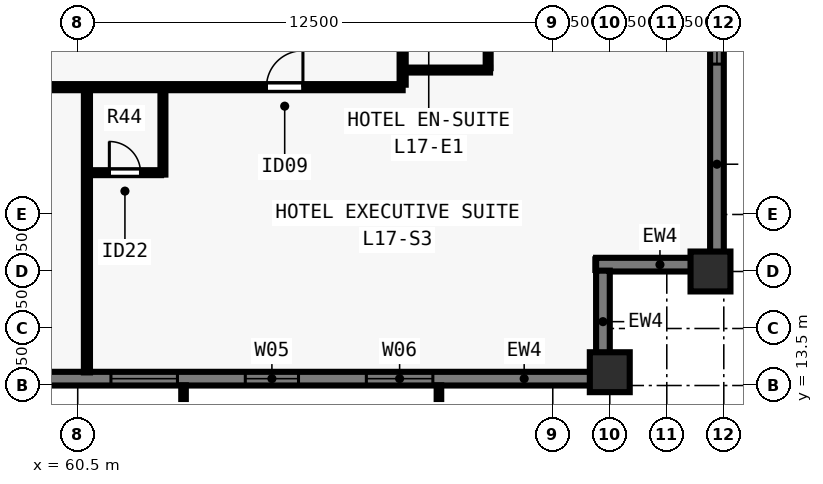
"""IFC4 building model, lengths in metres.
Left out: names, types, materials, properties, quantities, classifications, styles, units other than length and angle.
Written with IfcOpenShell. Run it as: python <this file> out.ifc"""

import sys

from ifc_helpers import new_model, si_unit, direction, frame, frame_2d, origin, origin_2d, place, context, subcontext, project, spatial, rectangle, extrude, element, fill, save


model = new_model("IFC4")
c1 = context("Model", 3, precision=1e-05, world=origin(), true_north=direction((0.0, 1.0)))
c2 = subcontext(c1, "Body", "Model", "MODEL_VIEW")
j1 = project(units=[si_unit("LENGTHUNIT", "METRE"), si_unit("PLANEANGLEUNIT", "RADIAN")], contexts=[c1])
p1 = place(None, origin())
s1 = spatial("IfcSite", under=j1, at=p1, CompositionType="ELEMENT")
p2 = place(p1, origin())
s2 = spatial("IfcBuilding", under=s1, at=p2, CompositionType="ELEMENT")
p3 = place(p2, frame((0.0, 0.0, 65.5)))
s3 = spatial("IfcBuildingStorey", under=s2, at=p3, CompositionType="ELEMENT", Elevation=65.5)
for number, where, z_axis, x_axis in (
    (1, (74.5, 13.85, 0.0), (0.0, 0.0, 1.0), (1.0, 0.0, 0.0)),
    (2, (77.15, 16.5, 0.0), (0.0, 0.0, 1.0), (0.0, 1.0, 0.0)),
):
    element("IfcColumn", number, at=place(p3, frame(where, z_axis=z_axis, x_axis=x_axis)), inside=s3, PredefinedType="COLUMN", context=c2, shape_type="SweptSolid", body=[
        extrude(rectangle(XDim=1.05, YDim=1.05, at=origin_2d()), origin(), (0.0, 0.0, 1.0), 3.5),
    ])
p4 = place(p3, frame((77.32, 34.8, 0.0), z_axis=(0.0, 0.0, 1.0), x_axis=(0.0, -1.0, 0.0)))
e3 = element("IfcWall", 3, at=p4, inside=s3, PredefinedType="SOLIDWALL", context=c2, shape_type="SweptSolid", body=[
    extrude(rectangle(XDim=17.962, YDim=0.36, at=frame_2d((8.981, 0.0))), origin(), (0.0, 0.0, 1.0), 3.28),
])
p5 = place(p4, frame((2.519, 0.0, 0.8)))
e4 = element("IfcOpeningElement", 4, at=p5, cuts=e3, PredefinedType="OPENING", context=c2, shape_type="SweptSolid", body=[
    extrude(rectangle(XDim=1.75, YDim=1.544, at=frame_2d((0.875, 0.772))), frame((0.0, 0.19, 0.0), z_axis=(0.0, -1.0, 0.0), x_axis=(1.0, 0.0, 0.0)), (0.0, 0.0, 1.0), 0.38),
])
p6 = place(p4, frame((6.981, 0.0, 0.8)))
e5 = element("IfcOpeningElement", 5, at=p6, cuts=e3, PredefinedType="OPENING", context=c2, shape_type="SweptSolid", body=[
    extrude(rectangle(XDim=1.4, YDim=1.544, at=frame_2d((0.7, 0.772))), frame((0.0, 0.19, 0.0), z_axis=(0.0, -1.0, 0.0), x_axis=(1.0, 0.0, 0.0)), (0.0, 0.0, 1.0), 0.38),
])
p7 = place(p4, frame((11.093, 0.0, 0.8)))
e6 = element("IfcOpeningElement", 6, at=p7, cuts=e3, PredefinedType="OPENING", context=c2, shape_type="SweptSolid", body=[
    extrude(rectangle(XDim=1.75, YDim=1.544, at=frame_2d((0.875, 0.772))), frame((0.0, 0.19, 0.0), z_axis=(0.0, -1.0, 0.0), x_axis=(1.0, 0.0, 0.0)), (0.0, 0.0, 1.0), 0.38),
])
p8 = place(p3, frame((77.5, 16.68, 0.0), z_axis=(0.0, 0.0, 1.0), x_axis=(-1.0, 0.0, 0.0)))
e7 = element("IfcWall", 7, at=p8, inside=s3, PredefinedType="SOLIDWALL", context=c2, shape_type="SweptSolid", body=[
    extrude(rectangle(XDim=3.36, YDim=0.36, at=frame_2d((1.68, 0.0))), origin(), (0.0, 0.0, 1.0), 3.28),
])
p9 = place(p3, frame((74.32, 16.522, 0.0), z_axis=(0.0, 0.0, 1.0), x_axis=(0.0, -1.0, 0.0)))
e8 = element("IfcWall", 8, at=p9, inside=s3, PredefinedType="SOLIDWALL", context=c2, shape_type="SweptSolid", body=[
    extrude(rectangle(XDim=2.684, YDim=0.36, at=frame_2d((1.342, 0.0))), origin(), (0.0, 0.0, 1.0), 3.28),
])
p10 = place(p3, frame((74.5, 13.68, 0.0), z_axis=(0.0, 0.0, 1.0), x_axis=(-1.0, 0.0, 0.0)))
e9 = element("IfcWall", 9, at=p10, inside=s3, PredefinedType="SOLIDWALL", context=c2, shape_type="SweptSolid", body=[
    extrude(rectangle(XDim=44.662, YDim=0.36, at=frame_2d((22.331, 0.0))), origin(), (0.0, 0.0, 1.0), 3.28),
])
p11 = place(p10, frame((4.655, 0.0, 0.8)))
e10 = element("IfcOpeningElement", 10, at=p11, cuts=e9, PredefinedType="OPENING", context=c2, shape_type="SweptSolid", body=[
    extrude(rectangle(XDim=1.75, YDim=1.544, at=frame_2d((0.875, 0.772))), frame((0.0, 0.19, 0.0), z_axis=(0.0, -1.0, 0.0), x_axis=(1.0, 0.0, 0.0)), (0.0, 0.0, 1.0), 0.38),
])
p12 = place(p10, frame((8.19, 0.0, 0.8)))
e11 = element("IfcOpeningElement", 11, at=p12, cuts=e9, PredefinedType="OPENING", context=c2, shape_type="SweptSolid", body=[
    extrude(rectangle(XDim=1.4, YDim=1.544, at=frame_2d((0.7, 0.772))), frame((0.0, 0.19, 0.0), z_axis=(0.0, -1.0, 0.0), x_axis=(1.0, 0.0, 0.0)), (0.0, 0.0, 1.0), 0.38),
])
p13 = place(p10, frame((11.375, 0.0, 0.8)))
e12 = element("IfcOpeningElement", 12, at=p13, cuts=e9, PredefinedType="OPENING", context=c2, shape_type="SweptSolid", body=[
    extrude(rectangle(XDim=1.75, YDim=1.544, at=frame_2d((0.875, 0.772))), frame((0.0, 0.19, 0.0), z_axis=(0.0, -1.0, 0.0), x_axis=(1.0, 0.0, 0.0)), (0.0, 0.0, 1.0), 0.38),
])
p14 = place(p10, frame((14.911, 0.0, 0.8)))
e13 = element("IfcOpeningElement", 13, at=p14, cuts=e9, PredefinedType="OPENING", context=c2, shape_type="SweptSolid", body=[
    extrude(rectangle(XDim=1.4, YDim=1.544, at=frame_2d((0.7, 0.772))), frame((0.0, 0.19, 0.0), z_axis=(0.0, -1.0, 0.0), x_axis=(1.0, 0.0, 0.0)), (0.0, 0.0, 1.0), 0.38),
])
p15 = place(p10, frame((18.546, 0.0, 0.8)))
e14 = element("IfcOpeningElement", 14, at=p15, cuts=e9, PredefinedType="OPENING", context=c2, shape_type="SweptSolid", body=[
    extrude(rectangle(XDim=1.75, YDim=1.544, at=frame_2d((0.875, 0.772))), frame((0.0, 0.19, 0.0), z_axis=(0.0, -1.0, 0.0), x_axis=(1.0, 0.0, 0.0)), (0.0, 0.0, 1.0), 0.38),
])
p16 = place(p10, frame((21.631, 0.0, 0.8)))
e15 = element("IfcOpeningElement", 15, at=p16, cuts=e9, PredefinedType="OPENING", context=c2, shape_type="SweptSolid", body=[
    extrude(rectangle(XDim=1.4, YDim=1.544, at=frame_2d((0.7, 0.772))), frame((0.0, 0.19, 0.0), z_axis=(0.0, -1.0, 0.0), x_axis=(1.0, 0.0, 0.0)), (0.0, 0.0, 1.0), 0.38),
])
p17 = place(p10, frame((24.366, 0.0, 0.8)))
e16 = element("IfcOpeningElement", 16, at=p17, cuts=e9, PredefinedType="OPENING", context=c2, shape_type="SweptSolid", body=[
    extrude(rectangle(XDim=1.75, YDim=1.544, at=frame_2d((0.875, 0.772))), frame((0.0, 0.19, 0.0), z_axis=(0.0, -1.0, 0.0), x_axis=(1.0, 0.0, 0.0)), (0.0, 0.0, 1.0), 0.38),
])
p18 = place(p10, frame((28.351, 0.0, 0.8)))
e17 = element("IfcOpeningElement", 17, at=p18, cuts=e9, PredefinedType="OPENING", context=c2, shape_type="SweptSolid", body=[
    extrude(rectangle(XDim=1.4, YDim=1.544, at=frame_2d((0.7, 0.772))), frame((0.0, 0.19, 0.0), z_axis=(0.0, -1.0, 0.0), x_axis=(1.0, 0.0, 0.0)), (0.0, 0.0, 1.0), 0.38),
])
p19 = place(p10, frame((31.987, 0.0, 0.8)))
e18 = element("IfcOpeningElement", 18, at=p19, cuts=e9, PredefinedType="OPENING", context=c2, shape_type="SweptSolid", body=[
    extrude(rectangle(XDim=1.75, YDim=1.544, at=frame_2d((0.875, 0.772))), frame((0.0, 0.19, 0.0), z_axis=(0.0, -1.0, 0.0), x_axis=(1.0, 0.0, 0.0)), (0.0, 0.0, 1.0), 0.38),
])
p20 = place(p10, frame((35.072, 0.0, 0.8)))
e19 = element("IfcOpeningElement", 19, at=p20, cuts=e9, PredefinedType="OPENING", context=c2, shape_type="SweptSolid", body=[
    extrude(rectangle(XDim=1.4, YDim=1.544, at=frame_2d((0.7, 0.772))), frame((0.0, 0.19, 0.0), z_axis=(0.0, -1.0, 0.0), x_axis=(1.0, 0.0, 0.0)), (0.0, 0.0, 1.0), 0.38),
])
p21 = place(p10, frame((38.257, 0.0, 0.8)))
e20 = element("IfcOpeningElement", 20, at=p21, cuts=e9, PredefinedType="OPENING", context=c2, shape_type="SweptSolid", body=[
    extrude(rectangle(XDim=1.75, YDim=1.544, at=frame_2d((0.875, 0.772))), frame((0.0, 0.19, 0.0), z_axis=(0.0, -1.0, 0.0), x_axis=(1.0, 0.0, 0.0)), (0.0, 0.0, 1.0), 0.38),
])
p22 = place(p3, frame((34.95, 21.35, 0.0), z_axis=(0.0, 0.0, 1.0), x_axis=(1.0, 0.0, 0.0)))
e21 = element("IfcWall", 21, at=p22, inside=s3, PredefinedType="PARTITIONING", context=c2, shape_type="SweptSolid", body=[
    extrude(rectangle(XDim=34.1, YDim=0.16, at=frame_2d((17.05, 0.0))), origin(), (0.0, 0.0, 1.0), 3.28),
])
p23 = place(p22, frame((3.614, 0.0, 0.0)))
e22 = element("IfcOpeningElement", 22, at=p23, cuts=e21, PredefinedType="OPENING", context=c2, shape_type="SweptSolid", body=[
    extrude(rectangle(XDim=0.96, YDim=2.15, at=frame_2d((0.48, 1.075))), frame((0.0, 0.09, 0.0), z_axis=(0.0, -1.0, 0.0), x_axis=(1.0, 0.0, 0.0)), (0.0, 0.0, 1.0), 0.18),
])
p24 = place(p22, frame((17.56, 0.0, 0.0)))
e23 = element("IfcOpeningElement", 23, at=p24, cuts=e21, PredefinedType="OPENING", context=c2, shape_type="SweptSolid", body=[
    extrude(rectangle(XDim=0.96, YDim=2.15, at=frame_2d((0.48, 1.075))), frame((0.0, 0.09, 0.0), z_axis=(0.0, -1.0, 0.0), x_axis=(1.0, 0.0, 0.0)), (0.0, 0.0, 1.0), 0.18),
])
p25 = place(p22, frame((30.516, 0.0, 0.0)))
e24 = element("IfcOpeningElement", 24, at=p25, cuts=e21, PredefinedType="OPENING", context=c2, shape_type="SweptSolid", body=[
    extrude(rectangle(XDim=0.96, YDim=2.15, at=frame_2d((0.48, 1.075))), frame((0.0, 0.09, 0.0), z_axis=(0.0, -1.0, 0.0), x_axis=(1.0, 0.0, 0.0)), (0.0, 0.0, 1.0), 0.18),
])
p26 = place(p3, frame((69.05, 21.415, 0.0), z_axis=(0.0, 0.0, 1.0), x_axis=(0.0, 1.0, 0.0)))
e25 = element("IfcWall", 25, at=p26, inside=s3, PredefinedType="PARTITIONING", context=c2, shape_type="SweptSolid", body=[
    extrude(rectangle(XDim=35.17, YDim=0.16, at=frame_2d((17.585, 0.0))), origin(), (0.0, 0.0, 1.0), 3.28),
])
p27 = place(p26, frame((9.746, 0.0, 0.0)))
e26 = element("IfcOpeningElement", 26, at=p27, cuts=e25, PredefinedType="OPENING", context=c2, shape_type="SweptSolid", body=[
    extrude(rectangle(XDim=0.96, YDim=2.15, at=frame_2d((0.48, 1.075))), frame((0.0, 0.09, 0.0), z_axis=(0.0, -1.0, 0.0), x_axis=(1.0, 0.0, 0.0)), (0.0, 0.0, 1.0), 0.18),
])
p28 = place(p26, frame((27.146, 0.0, 0.0)))
e27 = element("IfcOpeningElement", 27, at=p28, cuts=e25, PredefinedType="OPENING", context=c2, shape_type="SweptSolid", body=[
    extrude(rectangle(XDim=0.96, YDim=2.15, at=frame_2d((0.48, 1.075))), frame((0.0, 0.09, 0.0), z_axis=(0.0, -1.0, 0.0), x_axis=(1.0, 0.0, 0.0)), (0.0, 0.0, 1.0), 0.18),
])
p29 = place(p3, frame((60.742, 13.845, 0.0), z_axis=(0.0, 0.0, 1.0), x_axis=(0.0, 1.0, 0.0)))
e28 = element("IfcWall", 28, at=p29, inside=s3, PredefinedType="PARTITIONING", context=c2, shape_type="SweptSolid", body=[
    extrude(rectangle(XDim=7.44, YDim=0.16, at=frame_2d((3.72, 0.0))), origin(), (0.0, 0.0, 1.0), 3.28),
])
p30 = place(p3, frame((62.742, 19.05, 0.0), z_axis=(0.0, 0.0, 1.0), x_axis=(0.0, 1.0, 0.0)))
e29 = element("IfcWall", 29, at=p30, inside=s3, PredefinedType="PLUMBINGWALL", context=c2, shape_type="SweptSolid", body=[
    extrude(rectangle(XDim=2.235, YDim=0.13, at=frame_2d((1.117, 0.0))), origin(), (0.0, 0.0, 1.0), 3.28),
])
p31 = place(p3, frame((60.808, 19.1, 0.0), z_axis=(0.0, 0.0, 1.0), x_axis=(1.0, 0.0, 0.0)))
e30 = element("IfcWall", 30, at=p31, inside=s3, PredefinedType="PLUMBINGWALL", context=c2, shape_type="SweptSolid", body=[
    extrude(rectangle(XDim=1.885, YDim=0.13, at=frame_2d((0.942, 0.0))), origin(), (0.0, 0.0, 1.0), 3.28),
])
p32 = place(p31, frame((0.525, 0.0, 0.0)))
e31 = element("IfcOpeningElement", 31, at=p32, cuts=e30, PredefinedType="OPENING", context=c2, shape_type="SweptSolid", body=[
    extrude(rectangle(XDim=0.82, YDim=2.1, at=frame_2d((0.41, 1.05))), frame((0.0, 0.075, 0.0), z_axis=(0.0, -1.0, 0.0), x_axis=(1.0, 0.0, 0.0)), (0.0, 0.0, 1.0), 0.15),
])
p33 = place(p3, frame((69.115, 21.8, 0.0), z_axis=(0.0, 0.0, 1.0), x_axis=(1.0, 0.0, 0.0)))
e32 = element("IfcWall", 32, at=p33, inside=s3, PredefinedType="PLUMBINGWALL", context=c2, shape_type="SweptSolid", body=[
    extrude(rectangle(XDim=2.235, YDim=0.13, at=frame_2d((1.118, 0.0))), origin(), (0.0, 0.0, 1.0), 2.849),
])
p34 = place(p3, frame((71.3, 21.85, 0.0), z_axis=(0.0, 0.0, 1.0), x_axis=(0.0, 1.0, 0.0)))
e33 = element("IfcWall", 33, at=p34, inside=s3, PredefinedType="PLUMBINGWALL", context=c2, shape_type="SweptSolid", body=[
    extrude(rectangle(XDim=1.9, YDim=0.13, at=frame_2d((0.95, 0.0))), origin(), (0.0, 0.0, 1.0), 3.28),
])
p35 = place(p34, frame((0.54, 0.0, 0.0)))
e34 = element("IfcOpeningElement", 34, at=p35, cuts=e33, PredefinedType="OPENING", context=c2, shape_type="SweptSolid", body=[
    extrude(rectangle(XDim=0.82, YDim=2.1, at=frame_2d((0.41, 1.05))), frame((0.0, 0.075, 0.0), z_axis=(0.0, -1.0, 0.0), x_axis=(1.0, 0.0, 0.0)), (0.0, 0.0, 1.0), 0.15),
])
p36 = place(p7, origin())
e35 = element("IfcWindow", 35, at=p36, inside=s3, PartitioningType="SINGLE_PANEL", PredefinedType="WINDOW", context=c2, shape_type="SweptSolid", body=[
    extrude(rectangle(XDim=1.75, YDim=1.544, at=frame_2d((0.875, 0.772))), frame((0.0, -0.05, 0.0), z_axis=(0.0, -1.0, 0.0), x_axis=(1.0, 0.0, 0.0)), (0.0, 0.0, 1.0), 0.06),
])
fill(e6, e35)
p37 = place(p11, origin())
e36 = element("IfcWindow", 36, at=p37, inside=s3, PartitioningType="SINGLE_PANEL", PredefinedType="WINDOW", context=c2, shape_type="SweptSolid", body=[
    extrude(rectangle(XDim=1.75, YDim=1.544, at=frame_2d((0.875, 0.772))), frame((0.0, -0.05, 0.0), z_axis=(0.0, -1.0, 0.0), x_axis=(1.0, 0.0, 0.0)), (0.0, 0.0, 1.0), 0.06),
])
fill(e10, e36)
p38 = place(p12, origin())
e37 = element("IfcWindow", 37, at=p38, inside=s3, PartitioningType="SINGLE_PANEL", PredefinedType="WINDOW", context=c2, shape_type="SweptSolid", body=[
    extrude(rectangle(XDim=1.4, YDim=1.544, at=frame_2d((0.7, 0.772))), frame((0.0, -0.05, 0.0), z_axis=(0.0, -1.0, 0.0), x_axis=(1.0, 0.0, 0.0)), (0.0, 0.0, 1.0), 0.06),
])
fill(e11, e37)
p39 = place(p13, origin())
e38 = element("IfcWindow", 38, at=p39, inside=s3, PartitioningType="SINGLE_PANEL", PredefinedType="WINDOW", context=c2, shape_type="SweptSolid", body=[
    extrude(rectangle(XDim=1.75, YDim=1.544, at=frame_2d((0.875, 0.772))), frame((0.0, -0.05, 0.0), z_axis=(0.0, -1.0, 0.0), x_axis=(1.0, 0.0, 0.0)), (0.0, 0.0, 1.0), 0.06),
])
fill(e12, e38)
p40 = place(p32, origin())
e39 = element("IfcDoor", 39, at=p40, inside=s3, OperationType="SINGLE_SWING_LEFT", PredefinedType="DOOR", context=c2, shape_type="SweptSolid", body=[
    extrude(rectangle(XDim=0.82, YDim=2.1, at=frame_2d((0.41, 1.05))), frame((0.0, 0.025, 0.0), z_axis=(0.0, -1.0, 0.0), x_axis=(1.0, 0.0, 0.0)), (0.0, 0.0, 1.0), 0.05),
])
fill(e31, e39)
p41 = place(p25, origin())
e40 = element("IfcDoor", 40, at=p41, inside=s3, OperationType="SINGLE_SWING_RIGHT", PredefinedType="DOOR", context=c2, shape_type="SweptSolid", body=[
    extrude(rectangle(XDim=0.96, YDim=2.15, at=frame_2d((0.48, 1.075))), frame((0.0, 0.025, 0.0), z_axis=(0.0, -1.0, 0.0), x_axis=(1.0, 0.0, 0.0)), (0.0, 0.0, 1.0), 0.05),
])
fill(e24, e40)
save(model, sys.argv[1])
